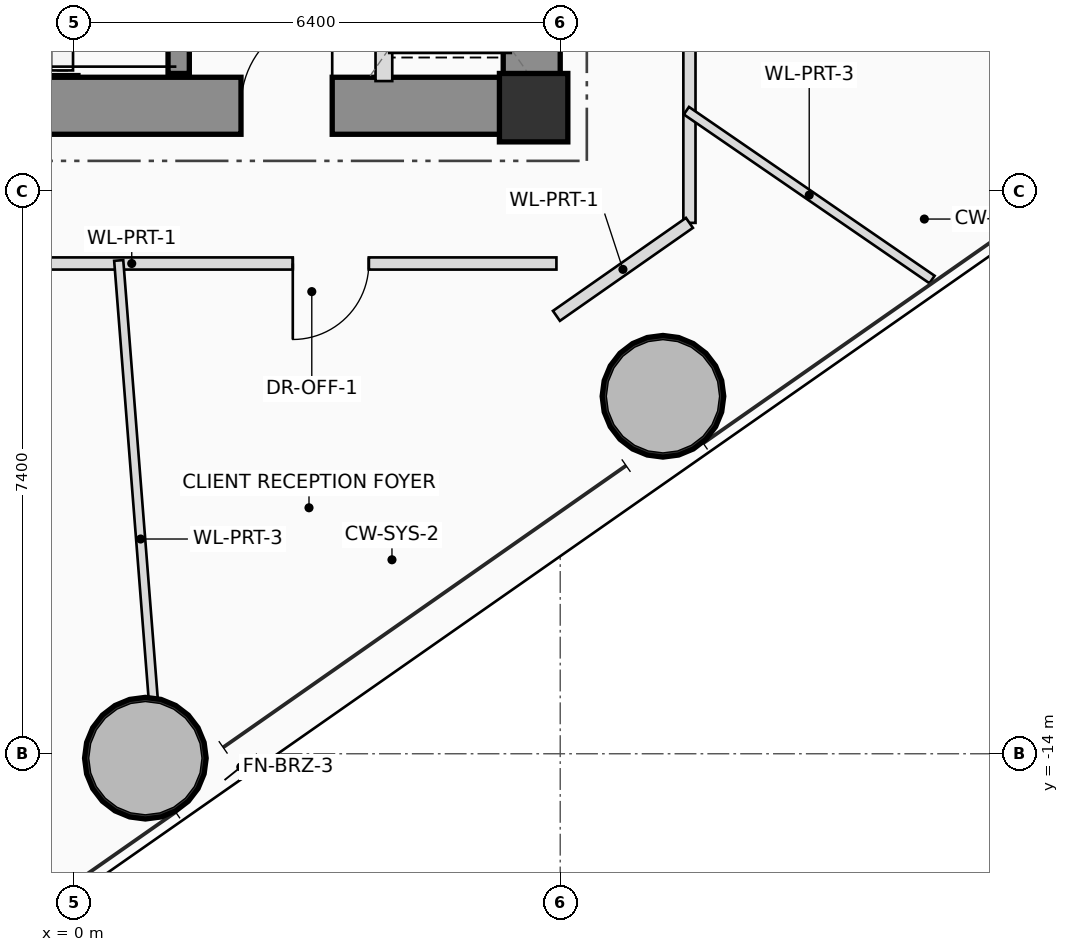
"""IFC4 building model, lengths in metres.
Left out: names, types, materials, properties, quantities, classifications, styles, units other than length and angle.
Written with IfcOpenShell. Run it as: python <this file> out.ifc"""

import sys

from ifc_helpers import new_model, si_unit, direction, frame, frame_2d, origin, origin_2d, place, context, subcontext, project, spatial, rectangle, hollow_circle, extrude, source, transform, mapped, element, fill, save


model = new_model("IFC4")
c1 = context("Model", 3, precision=1e-05, world=origin(), true_north=direction((0.0, 1.0)))
c2 = subcontext(c1, "Body", "Model", "MODEL_VIEW")
j1 = project(units=[si_unit("LENGTHUNIT", "METRE"), si_unit("PLANEANGLEUNIT", "RADIAN")], contexts=[c1])
p1 = place(None, origin())
s1 = spatial("IfcSite", under=j1, at=p1, CompositionType="ELEMENT")
p2 = place(p1, origin())
s2 = spatial("IfcBuilding", under=s1, at=p2, CompositionType="ELEMENT")
p3 = place(p2, frame((0.0, 0.0, 69.8)))
s3 = spatial("IfcBuildingStorey", under=s2, at=p3, CompositionType="ELEMENT", Elevation=69.8)
m1 = source(origin(), c2, "Body", "SweptSolid", [
    extrude(rectangle(XDim=0.9, YDim=0.9, at=origin_2d()), origin(), (0.0, 0.0, 1.0), 3.75),
])
p4 = place(p3, frame((6.05, -5.5, 0.0), z_axis=(0.0, 0.0, 1.0), x_axis=(1.0, 0.0, 0.0)))
e1 = element("IfcColumn", 1, at=p4, inside=s3, PredefinedType="COLUMN", context=c2, shape_type="MappedRepresentation", body=[
    mapped(m1, transform((0.0, 0.0, 0.0), scale=1.0)),
])
p5 = place(p3, frame((-6.4, -5.475, 0.0), z_axis=(0.0, 0.0, 1.0), x_axis=(1.0, 0.0, 0.0)))
e2 = element("IfcWall", 2, at=p5, inside=s3, PredefinedType="SHEAR", context=c2, shape_type="SweptSolid", body=[
    extrude(rectangle(XDim=12.8, YDim=0.75, at=frame_2d((6.4, 0.0))), origin(), (0.0, 0.0, 1.0), 3.75),
])
p6 = place(p5, frame((8.6, 0.0, 0.0)))
e3 = element("IfcOpeningElement", 3, at=p6, cuts=e2, PredefinedType="OPENING", context=c2, shape_type="SweptSolid", body=[
    extrude(rectangle(XDim=1.2, YDim=2.2, at=frame_2d((0.6, 1.1))), frame((0.0, 0.385, 0.0), z_axis=(0.0, -1.0, 0.0), x_axis=(1.0, 0.0, 0.0)), (0.0, 0.0, 1.0), 0.77),
])
p7 = place(p3, frame((6.025, -5.1, 0.0), z_axis=(0.0, 0.0, 1.0), x_axis=(0.0, 1.0, 0.0)))
e4 = element("IfcWall", 4, at=p7, inside=s3, PredefinedType="SHEAR", context=c2, shape_type="SweptSolid", body=[
    extrude(rectangle(XDim=10.2, YDim=0.75, at=frame_2d((5.1, 0.0))), origin(), (0.0, 0.0, 1.0), 3.75),
])
p8 = place(p3, frame((1.38, -5.05, 0.0), z_axis=(0.0, 0.0, 1.0), x_axis=(0.0, 1.0, 0.0)))
e5 = element("IfcWall", 5, at=p8, inside=s3, PredefinedType="SHEAR", context=c2, shape_type="SweptSolid", body=[
    extrude(rectangle(XDim=0.8, YDim=0.28, at=frame_2d((0.4, 0.0))), origin(), (0.0, 0.0, 1.0), 3.75),
])
m2 = source(origin(), c2, "Body", "SweptSolid", [
    extrude(hollow_circle(Radius=0.8, WallThickness=0.055, at=origin_2d()), origin(), (0.0, 0.0, 1.0), 3.75),
])
for number, where, z_axis, x_axis in (
    (6, (0.942, -14.058, 0.0), (0.0, 0.0, 1.0), (1.0, 0.0, 0.0)),
    (7, (7.752, -9.297, 0.0), (0.0, 0.0, 1.0), (1.0, 0.0, 0.0)),
):
    element("IfcColumn", number, at=place(p3, frame(where, z_axis=z_axis, x_axis=x_axis)), inside=s3, PredefinedType="COLUMN", context=c2, shape_type="MappedRepresentation", body=[
        mapped(m2, transform((0.0, 0.0, 0.0), scale=1.0)),
    ])
p9 = place(p3, frame((4.08, -5.15, 0.0), z_axis=(0.0, 0.0, 1.0), x_axis=(0.0, 1.0, 0.0)))
e8 = element("IfcWall", 8, at=p9, inside=s3, PredefinedType="PLUMBINGWALL", context=c2, shape_type="SweptSolid", body=[
    extrude(rectangle(XDim=2.95, YDim=0.22, at=frame_2d((1.475, 0.0))), origin(), (0.0, 0.0, 1.0), 3.545),
])
p10 = place(p9, frame((0.95, 0.0, 0.0)))
e9 = element("IfcOpeningElement", 9, at=p10, cuts=e8, PredefinedType="OPENING", context=c2, shape_type="SweptSolid", body=[
    extrude(rectangle(XDim=1.2, YDim=2.25, at=frame_2d((0.6, 1.125))), frame((0.0, 0.12, 0.0), z_axis=(0.0, -1.0, 0.0), x_axis=(1.0, 0.0, 0.0)), (0.0, 0.0, 1.0), 0.24),
])
p11 = place(p3, frame((8.1, -0.02, 0.0), z_axis=(0.0, 0.0, 1.0), x_axis=(0.0, -1.0, 0.0)))
e10 = element("IfcWall", 10, at=p11, inside=s3, PredefinedType="PARTITIONING", context=c2, shape_type="SweptSolid", body=[
    extrude(rectangle(XDim=6.995, YDim=0.16, at=frame_2d((3.498, 0.0))), origin(), (0.0, 0.0, 1.0), 2.85),
])
p12 = place(p3, frame((8.1, -7.015, 0.0), z_axis=(0.0, 0.0, 1.0), x_axis=(-0.81953260104, -0.573032560883, 0.0)))
e11 = element("IfcWall", 11, at=p12, inside=s3, PredefinedType="PARTITIONING", context=c2, shape_type="SweptSolid", body=[
    extrude(rectangle(XDim=2.135, YDim=0.16, at=frame_2d((1.068, 0.0))), origin(), (0.0, 0.0, 1.0), 2.85),
])
p13 = place(p3, frame((6.35, -7.55, 0.0), z_axis=(0.0, 0.0, 1.0), x_axis=(-1.0, 0.0, 0.0)))
e12 = element("IfcWall", 12, at=p13, inside=s3, PredefinedType="PARTITIONING", context=c2, shape_type="SweptSolid", body=[
    extrude(rectangle(XDim=12.7, YDim=0.16, at=frame_2d((6.35, 0.0))), origin(), (0.0, 0.0, 1.0), 2.85),
])
p14 = place(p13, frame((2.469, 0.0, 0.0)))
e13 = element("IfcOpeningElement", 13, at=p14, cuts=e12, PredefinedType="OPENING", context=c2, shape_type="SweptSolid", body=[
    extrude(rectangle(XDim=1.0, YDim=2.25, at=frame_2d((0.5, 1.125))), frame((0.0, 0.09, 0.0), z_axis=(0.0, -1.0, 0.0), x_axis=(1.0, 0.0, 0.0)), (0.0, 0.0, 1.0), 0.18),
])
p15 = place(p13, frame((7.707, 0.0, 0.0)))
e14 = element("IfcOpeningElement", 14, at=p15, cuts=e12, PredefinedType="OPENING", context=c2, shape_type="SweptSolid", body=[
    extrude(rectangle(XDim=1.0, YDim=2.25, at=frame_2d((0.5, 1.125))), frame((0.0, 0.09, 0.0), z_axis=(0.0, -1.0, 0.0), x_axis=(1.0, 0.0, 0.0)), (0.0, 0.0, 1.0), 0.18),
])
p16 = place(p3, frame((0.591, -7.51, 0.0), z_axis=(0.0, 0.0, 1.0), x_axis=(0.078466268921, -0.996916769165, 0.0)))
e15 = element("IfcWall", 15, at=p16, inside=s3, PredefinedType="PARTITIONING", context=c2, shape_type="SweptSolid", body=[
    extrude(rectangle(XDim=7.352, YDim=0.12, at=frame_2d((3.676, 0.0))), origin(), (0.0, 0.0, 1.0), 3.05),
])
p17 = place(p3, frame((8.06, -5.54, 0.0), z_axis=(0.0, 0.0, 1.0), x_axis=(0.824103676806, -0.566438990426, 0.0)))
e16 = element("IfcWall", 16, at=p17, inside=s3, PredefinedType="PARTITIONING", context=c2, shape_type="SweptSolid", body=[
    extrude(rectangle(XDim=3.922, YDim=0.12, at=frame_2d((1.961, 0.0))), origin(), (0.0, 0.0, 1.0), 3.01),
])
p18 = place(p6, origin())
e17 = element("IfcDoor", 17, at=p18, inside=s3, OperationType="SINGLE_SWING_RIGHT", PredefinedType="DOOR", context=c2, shape_type="SweptSolid", body=[
    extrude(rectangle(XDim=1.2, YDim=2.2, at=frame_2d((0.6, 1.1))), frame((0.0, 0.025, 0.0), z_axis=(0.0, -1.0, 0.0), x_axis=(1.0, 0.0, 0.0)), (0.0, 0.0, 1.0), 0.05),
])
fill(e3, e17)
p19 = place(p14, origin())
e18 = element("IfcDoor", 18, at=p19, inside=s3, OperationType="SINGLE_SWING_RIGHT", PredefinedType="DOOR", context=c2, shape_type="SweptSolid", body=[
    extrude(rectangle(XDim=1.0, YDim=2.25, at=frame_2d((0.5, 1.125))), frame((0.0, 0.025, 0.0), z_axis=(0.0, -1.0, 0.0), x_axis=(1.0, 0.0, 0.0)), (0.0, 0.0, 1.0), 0.05),
])
fill(e13, e18)
save(model, sys.argv[1])
